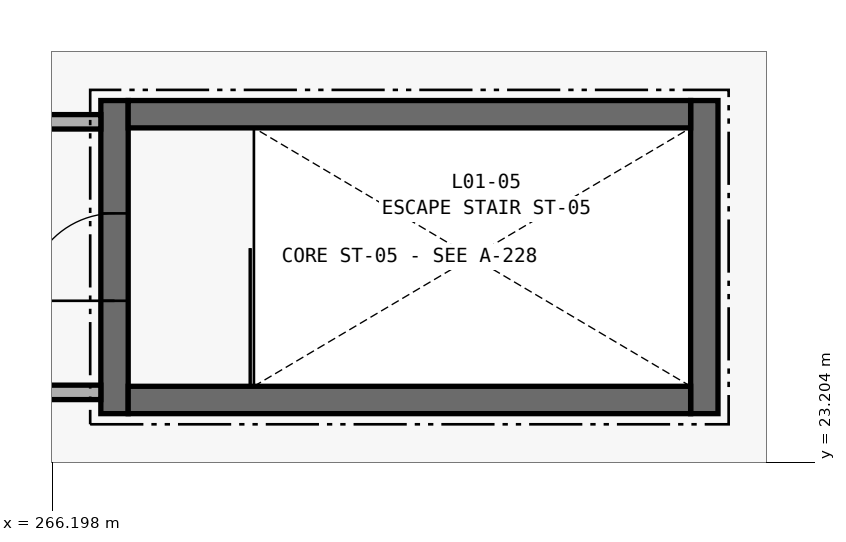
"""IFC4 building model, lengths in metres.
Left out: names, types, materials, properties, quantities, classifications, styles, units other than length and angle.
Written with IfcOpenShell. Run it as: python <this file> out.ifc"""

import sys

from ifc_helpers import new_model, si_unit, direction, frame, frame_2d, origin, place, context, subcontext, project, spatial, rectangle, extrude, element, fill, save


model = new_model("IFC4")
c1 = context("Model", 3, precision=1e-05, world=origin(), true_north=direction((0.0, 1.0)))
c2 = subcontext(c1, "Body", "Model", "MODEL_VIEW")
j1 = project(units=[si_unit("LENGTHUNIT", "METRE"), si_unit("PLANEANGLEUNIT", "RADIAN")], contexts=[c1])
p1 = place(None, origin())
s1 = spatial("IfcSite", under=j1, at=p1, CompositionType="ELEMENT")
p2 = place(p1, origin())
s2 = spatial("IfcBuilding", under=s1, at=p2, CompositionType="ELEMENT")
p3 = place(p2, frame((0.0, 0.0, 4.8)))
s3 = spatial("IfcBuildingStorey", under=s2, at=p3, CompositionType="ELEMENT", Elevation=4.8)
p4 = place(p3, frame((267.02, 23.84, 0.0), z_axis=(0.0, 0.0, 1.0), x_axis=(0.0, 1.0, 0.0)))
e1 = element("IfcWall", 1, at=p4, inside=s3, PredefinedType="SHEAR", context=c2, shape_type="SweptSolid", body=[
    extrude(rectangle(XDim=4.12, YDim=0.36, at=frame_2d((2.06, 0.0))), origin(), (0.0, 0.0, 1.0), 3.88),
])
p5 = place(p4, frame((1.485, 0.0, 0.0)))
e2 = element("IfcOpeningElement", 2, at=p5, cuts=e1, PredefinedType="OPENING", context=c2, shape_type="SweptSolid", body=[
    extrude(rectangle(XDim=1.15, YDim=2.15, at=frame_2d((0.575, 1.075))), frame((0.0, 0.195, 0.0), z_axis=(0.0, -1.0, 0.0), x_axis=(1.0, 0.0, 0.0)), (0.0, 0.0, 1.0), 0.39),
])
p6 = place(p3, frame((274.78, 23.84, 0.0), z_axis=(0.0, 0.0, 1.0), x_axis=(0.0, 1.0, 0.0)))
e3 = element("IfcWall", 3, at=p6, inside=s3, PredefinedType="SHEAR", context=c2, shape_type="SweptSolid", body=[
    extrude(rectangle(XDim=4.12, YDim=0.36, at=frame_2d((2.06, 0.0))), origin(), (0.0, 0.0, 1.0), 3.88),
])
for number, where, z_axis, x_axis in (
    (4, (267.2, 27.78, 0.0), (0.0, 0.0, 1.0), (1.0, 0.0, 0.0)),
    (5, (267.2, 24.02, 0.0), (0.0, 0.0, 1.0), (1.0, 0.0, 0.0)),
):
    element("IfcWall", number, at=place(p3, frame(where, z_axis=z_axis, x_axis=x_axis)), inside=s3, PredefinedType="SHEAR", context=c2, shape_type="SweptSolid", body=[
        extrude(rectangle(XDim=7.4, YDim=0.36, at=frame_2d((3.7, 0.0))), origin(), (0.0, 0.0, 1.0), 3.88),
    ])
p7 = place(p3, frame((262.825, 24.12, 0.0), z_axis=(0.0, 0.0, 1.0), x_axis=(1.0, 0.0, 0.0)))
e6 = element("IfcWall", 6, at=p7, inside=s3, PredefinedType="PARTITIONING", context=c2, shape_type="SweptSolid", body=[
    extrude(rectangle(XDim=4.015, YDim=0.19, at=frame_2d((2.008, 0.0))), origin(), (0.0, 0.0, 1.0), 2.76),
])
p8 = place(p3, frame((265.685, 27.68, 0.0), z_axis=(0.0, 0.0, 1.0), x_axis=(1.0, 0.0, 0.0)))
e7 = element("IfcWall", 7, at=p8, inside=s3, PredefinedType="PARTITIONING", context=c2, shape_type="SweptSolid", body=[
    extrude(rectangle(XDim=1.155, YDim=0.19, at=frame_2d((0.578, 0.0))), origin(), (0.0, 0.0, 1.0), 2.76),
])
p9 = place(p5, origin())
e8 = element("IfcDoor", 8, at=p9, inside=s3, OperationType="SINGLE_SWING_LEFT", PredefinedType="DOOR", context=c2, shape_type="SweptSolid", body=[
    extrude(rectangle(XDim=1.15, YDim=2.15, at=frame_2d((0.575, 1.075))), frame((0.0, 0.025, 0.0), z_axis=(0.0, -1.0, 0.0), x_axis=(1.0, 0.0, 0.0)), (0.0, 0.0, 1.0), 0.05),
])
fill(e2, e8)
save(model, sys.argv[1])
